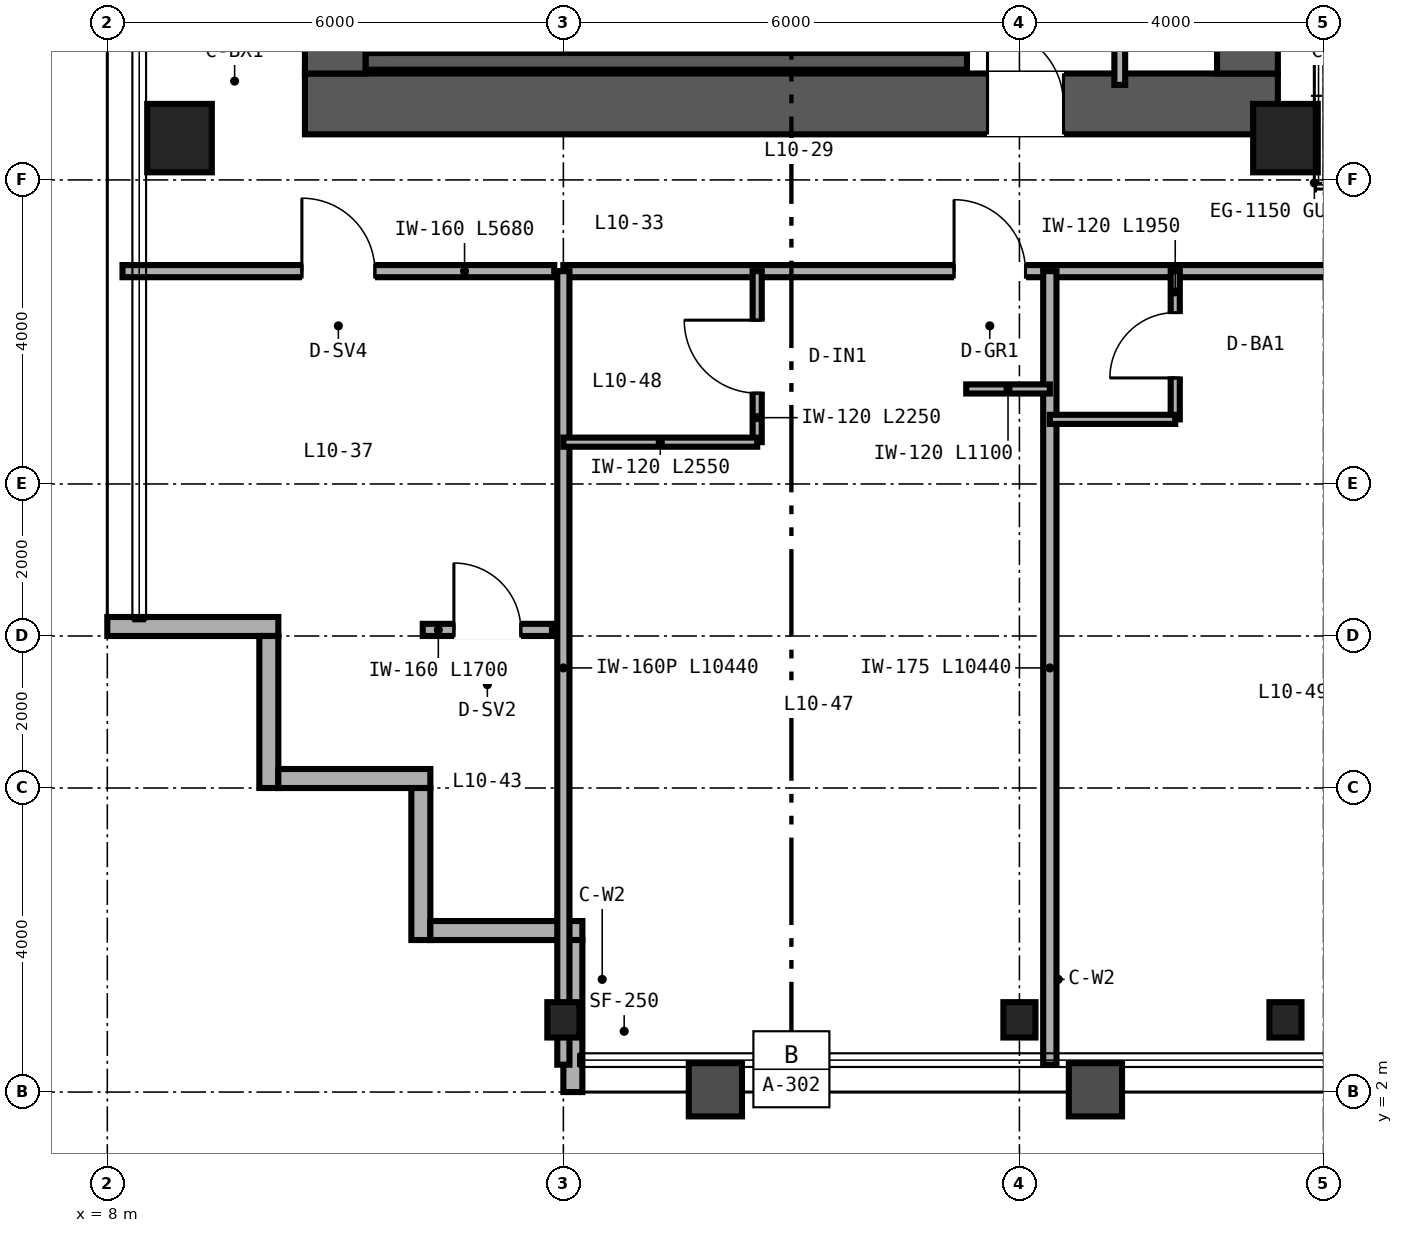
"""IFC4 building model, lengths in metres.
Left out: names, types, materials, properties, quantities, classifications, styles, units other than length and angle.
Written with IfcOpenShell. Run it as: python <this file> out.ifc"""

import sys

from ifc_helpers import new_model, si_unit, direction, frame, frame_2d, origin, origin_2d, place, context, subcontext, project, spatial, rectangle, hollow_rectangle, i_section, extrude, source, transform, mapped, element, fill, save


model = new_model("IFC4")
c1 = context("Model", 3, precision=1e-05, world=origin(), true_north=direction((0.0, 1.0)))
c2 = subcontext(c1, "Body", "Model", "MODEL_VIEW")
j1 = project(units=[si_unit("LENGTHUNIT", "METRE"), si_unit("PLANEANGLEUNIT", "RADIAN")], contexts=[c1])
p1 = place(None, origin())
s1 = spatial("IfcSite", under=j1, at=p1, CompositionType="ELEMENT")
p2 = place(p1, origin())
s2 = spatial("IfcBuilding", under=s1, at=p2, CompositionType="ELEMENT")
p3 = place(p2, frame((0.0, 0.0, 45.6)))
s3 = spatial("IfcBuildingStorey", under=s2, at=p3, CompositionType="ELEMENT", Elevation=45.6)
p4 = place(p3, frame((10.6, 15.0, 0.0), z_axis=(0.0, 0.0, 1.0), x_axis=(1.0, 0.0, 0.0)))
e1 = element("IfcWall", 1, at=p4, inside=s3, PredefinedType="SHEAR", context=c2, shape_type="SweptSolid", body=[
    extrude(rectangle(XDim=12.8, YDim=0.8, at=frame_2d((6.4, 0.0))), origin(), (0.0, 0.0, 1.0), 3.35),
])
p5 = place(p4, frame((8.98, 0.0, 0.0)))
e2 = element("IfcOpeningElement", 2, at=p5, cuts=e1, PredefinedType="OPENING", context=c2, shape_type="SweptSolid", body=[
    extrude(rectangle(XDim=1.0, YDim=2.15, at=frame_2d((0.5, 1.075))), frame((0.0, 0.41, 0.0), z_axis=(0.0, -1.0, 0.0), x_axis=(1.0, 0.0, 0.0)), (0.0, 0.0, 1.0), 0.82),
])
for number, where, z_axis, x_axis in (
    (3, (11.0, 15.4, 0.0), (0.0, 0.0, 1.0), (0.0, 1.0, 0.0)),
    (4, (23.0, 15.4, 0.0), (0.0, 0.0, 1.0), (0.0, 1.0, 0.0)),
):
    element("IfcWall", number, at=place(p3, frame(where, z_axis=z_axis, x_axis=x_axis)), inside=s3, PredefinedType="SHEAR", context=c2, shape_type="SweptSolid", body=[
        extrude(rectangle(XDim=21.2, YDim=0.8, at=frame_2d((10.6, 0.0))), origin(), (0.0, 0.0, 1.0), 3.35),
    ])
p6 = place(p3, frame((11.4, 15.56, 0.0), z_axis=(0.0, 0.0, 1.0), x_axis=(1.0, 0.0, 0.0)))
e5 = element("IfcWall", 5, at=p6, inside=s3, PredefinedType="SHEAR", context=c2, shape_type="SweptSolid", body=[
    extrude(rectangle(XDim=7.91, YDim=0.22, at=frame_2d((3.955, 0.0))), origin(), (0.0, 0.0, 1.0), 3.4),
])
for number, where, z_axis, x_axis in (
    (6, (11.56, 15.67, 0.0), (0.0, 0.0, 1.0), (0.0, 1.0, 0.0)),
    (7, (19.2, 15.67, 0.0), (0.0, 0.0, 1.0), (0.0, 1.0, 0.0)),
):
    element("IfcWall", number, at=place(p3, frame(where, z_axis=z_axis, x_axis=x_axis)), inside=s3, PredefinedType="SHEAR", context=c2, shape_type="SweptSolid", body=[
        extrude(rectangle(XDim=3.28, YDim=0.22, at=frame_2d((1.64, 0.0))), origin(), (0.0, 0.0, 1.0), 3.4),
    ])
m1 = source(origin(), c2, "Body", "SweptSolid", [
    extrude(hollow_rectangle(XDim=0.85, YDim=0.9, WallThickness=0.04, at=origin_2d()), origin(), (0.0, 0.0, 1.0), 3.35),
])
for number, where, z_axis, x_axis in (
    (8, (8.95, 14.55, 0.0), (0.0, 0.0, 1.0), (1.0, 0.0, 0.0)),
    (9, (23.5, 14.55, 0.0), (0.0, 0.0, 1.0), (1.0, 0.0, 0.0)),
):
    element("IfcColumn", number, at=place(p3, frame(where, z_axis=z_axis, x_axis=x_axis)), inside=s3, PredefinedType="COLUMN", context=c2, shape_type="MappedRepresentation", body=[
        mapped(m1, transform((0.0, 0.0, 0.0), scale=1.0)),
    ])
m2 = source(origin(), c2, "Body", "SweptSolid", [
    extrude(i_section(OverallWidth=0.422, OverallDepth=0.465, WebThickness=0.045, FlangeThickness=0.073, FilletRadius=0.025, at=origin_2d()), origin(), (0.0, 0.0, 1.0), 3.35),
])
for number, where, z_axis, x_axis in (
    (10, (14.0, 2.95, 0.0), (0.0, 0.0, 1.0), (1.0, 0.0, 0.0)),
    (11, (20.0, 2.95, 0.0), (0.0, 0.0, 1.0), (1.0, 0.0, 0.0)),
    (12, (23.5, 2.95, 0.0), (0.0, 0.0, 1.0), (1.0, 0.0, 0.0)),
):
    element("IfcColumn", number, at=place(p3, frame(where, z_axis=z_axis, x_axis=x_axis)), inside=s3, PredefinedType="COLUMN", context=c2, shape_type="MappedRepresentation", body=[
        mapped(m2, transform((0.0, 0.0, 0.0), scale=1.0)),
    ])
p7 = place(p3, frame((8.0, 8.125, 0.0), z_axis=(0.0, 0.0, 1.0), x_axis=(1.0, 0.0, 0.0)))
e13 = element("IfcWall", 13, at=p7, inside=s3, PredefinedType="SOLIDWALL", context=c2, shape_type="SweptSolid", body=[
    extrude(rectangle(XDim=2.25, YDim=0.25, at=frame_2d((1.125, 0.0))), origin(), (0.0, 0.0, 1.0), 3.35),
])
for number, where, z_axis, x_axis in (
    (14, (10.125, 8.0, 0.0), (0.0, 0.0, 1.0), (0.0, -1.0, 0.0)),
    (15, (10.25, 6.125, 0.0), (0.0, 0.0, 1.0), (1.0, 0.0, 0.0)),
    (16, (12.125, 6.0, 0.0), (0.0, 0.0, 1.0), (0.0, -1.0, 0.0)),
    (17, (12.25, 4.125, 0.0), (0.0, 0.0, 1.0), (1.0, 0.0, 0.0)),
):
    element("IfcWall", number, at=place(p3, frame(where, z_axis=z_axis, x_axis=x_axis)), inside=s3, PredefinedType="SOLIDWALL", context=c2, shape_type="SweptSolid", body=[
        extrude(rectangle(XDim=2.0, YDim=0.25, at=frame_2d((1.0, 0.0))), origin(), (0.0, 0.0, 1.0), 3.35),
    ])
p8 = place(p3, frame((14.125, 4.0, 0.0), z_axis=(0.0, 0.0, 1.0), x_axis=(0.0, -1.0, 0.0)))
e18 = element("IfcWall", 18, at=p8, inside=s3, PredefinedType="SOLIDWALL", context=c2, shape_type="SweptSolid", body=[
    extrude(rectangle(XDim=2.0, YDim=0.25, at=frame_2d((1.0, 0.0))), origin(), (0.0, 0.0, 1.0), 2.657),
])
p9 = place(p3, frame((21.32, 15.25, 0.0), z_axis=(0.0, 0.0, 1.0), x_axis=(0.0, 1.0, 0.0)))
e19 = element("IfcWall", 19, at=p9, inside=s3, PredefinedType="PARTITIONING", context=c2, shape_type="SweptSolid", body=[
    extrude(rectangle(XDim=3.59, YDim=0.142, at=frame_2d((1.795, 0.0))), origin(), (0.0, 0.0, 1.0), 3.35),
])
p10 = place(p9, frame((1.25, 0.0, 0.0)))
e20 = element("IfcOpeningElement", 20, at=p10, cuts=e19, PredefinedType="OPENING", context=c2, shape_type="SweptSolid", body=[
    extrude(rectangle(XDim=0.84, YDim=2.1, at=frame_2d((0.42, 1.05))), frame((0.0, 0.081, 0.0), z_axis=(0.0, -1.0, 0.0), x_axis=(1.0, 0.0, 0.0)), (0.0, 0.0, 1.0), 0.162),
])
p11 = place(p3, frame((8.2, 12.8, 0.0), z_axis=(0.0, 0.0, 1.0), x_axis=(1.0, 0.0, 0.0)))
e21 = element("IfcWall", 21, at=p11, inside=s3, PredefinedType="PARTITIONING", context=c2, shape_type="SweptSolid", body=[
    extrude(rectangle(XDim=5.68, YDim=0.16, at=frame_2d((2.84, 0.0))), origin(), (0.0, 0.0, 1.0), 3.35),
])
p12 = place(p11, frame((2.36, 0.0, 0.0)))
e22 = element("IfcOpeningElement", 22, at=p12, cuts=e21, PredefinedType="OPENING", context=c2, shape_type="SweptSolid", body=[
    extrude(rectangle(XDim=0.96, YDim=2.15, at=frame_2d((0.48, 1.075))), frame((0.0, 0.09, 0.0), z_axis=(0.0, -1.0, 0.0), x_axis=(1.0, 0.0, 0.0)), (0.0, 0.0, 1.0), 0.18),
])
p13 = place(p3, frame((12.15, 8.08, 0.0), z_axis=(0.0, 0.0, 1.0), x_axis=(1.0, 0.0, 0.0)))
e23 = element("IfcWall", 23, at=p13, inside=s3, PredefinedType="PARTITIONING", context=c2, shape_type="SweptSolid", body=[
    extrude(rectangle(XDim=1.7, YDim=0.16, at=frame_2d((0.85, 0.0))), origin(), (0.0, 0.0, 1.0), 3.35),
])
p14 = place(p13, frame((0.41, 0.0, 0.0)))
e24 = element("IfcOpeningElement", 24, at=p14, cuts=e23, PredefinedType="OPENING", context=c2, shape_type="SweptSolid", body=[
    extrude(rectangle(XDim=0.88, YDim=2.15, at=frame_2d((0.44, 1.075))), frame((0.0, 0.09, 0.0), z_axis=(0.0, -1.0, 0.0), x_axis=(1.0, 0.0, 0.0)), (0.0, 0.0, 1.0), 0.18),
])
p15 = place(p3, frame((14.0, 12.8, 0.0), z_axis=(0.0, 0.0, 1.0), x_axis=(1.0, 0.0, 0.0)))
e25 = element("IfcWall", 25, at=p15, inside=s3, PredefinedType="PARTITIONING", context=c2, shape_type="SweptSolid", body=[
    extrude(rectangle(XDim=36.0, YDim=0.16, at=frame_2d((18.0, 0.0))), origin(), (0.0, 0.0, 1.0), 2.571),
])
p16 = place(p15, frame((5.14, 0.0, 0.0)))
e26 = element("IfcOpeningElement", 26, at=p16, cuts=e25, PredefinedType="OPENING", context=c2, shape_type="SweptSolid", body=[
    extrude(rectangle(XDim=0.94, YDim=2.15, at=frame_2d((0.47, 1.075))), frame((0.0, 0.09, 0.0), z_axis=(0.0, -1.0, 0.0), x_axis=(1.0, 0.0, 0.0)), (0.0, 0.0, 1.0), 0.18),
])
p17 = place(p15, frame((11.34, 0.0, 0.0)))
e27 = element("IfcOpeningElement", 27, at=p17, cuts=e25, PredefinedType="OPENING", context=c2, shape_type="SweptSolid", body=[
    extrude(rectangle(XDim=0.94, YDim=2.15, at=frame_2d((0.47, 1.075))), frame((0.0, 0.09, 0.0), z_axis=(0.0, -1.0, 0.0), x_axis=(1.0, 0.0, 0.0)), (0.0, 0.0, 1.0), 0.18),
])
p18 = place(p15, frame((17.94, 0.0, 0.0)))
e28 = element("IfcOpeningElement", 28, at=p18, cuts=e25, PredefinedType="OPENING", context=c2, shape_type="SweptSolid", body=[
    extrude(rectangle(XDim=0.94, YDim=2.15, at=frame_2d((0.47, 1.075))), frame((0.0, 0.09, 0.0), z_axis=(0.0, -1.0, 0.0), x_axis=(1.0, 0.0, 0.0)), (0.0, 0.0, 1.0), 0.18),
])
p19 = place(p15, frame((21.82, 0.0, 0.0)))
e29 = element("IfcOpeningElement", 29, at=p19, cuts=e25, PredefinedType="OPENING", context=c2, shape_type="SweptSolid", body=[
    extrude(rectangle(XDim=0.96, YDim=2.15, at=frame_2d((0.48, 1.075))), frame((0.0, 0.09, 0.0), z_axis=(0.0, -1.0, 0.0), x_axis=(1.0, 0.0, 0.0)), (0.0, 0.0, 1.0), 0.18),
])
p20 = place(p15, frame((29.54, 0.0, 0.0)))
e30 = element("IfcOpeningElement", 30, at=p20, cuts=e25, PredefinedType="OPENING", context=c2, shape_type="SweptSolid", body=[
    extrude(rectangle(XDim=0.94, YDim=2.15, at=frame_2d((0.47, 1.075))), frame((0.0, 0.09, 0.0), z_axis=(0.0, -1.0, 0.0), x_axis=(1.0, 0.0, 0.0)), (0.0, 0.0, 1.0), 0.18),
])
p21 = place(p15, frame((32.92, 0.0, 0.0)))
e31 = element("IfcOpeningElement", 31, at=p21, cuts=e25, PredefinedType="OPENING", context=c2, shape_type="SweptSolid", body=[
    extrude(rectangle(XDim=0.96, YDim=2.15, at=frame_2d((0.48, 1.075))), frame((0.0, 0.09, 0.0), z_axis=(0.0, -1.0, 0.0), x_axis=(1.0, 0.0, 0.0)), (0.0, 0.0, 1.0), 0.18),
])
p22 = place(p3, frame((14.0, 2.36, 0.0), z_axis=(0.0, 0.0, 1.0), x_axis=(0.0, 1.0, 0.0)))
e32 = element("IfcWall", 32, at=p22, inside=s3, PredefinedType="PARTITIONING", context=c2, shape_type="SweptSolid", body=[
    extrude(rectangle(XDim=10.44, YDim=0.16, at=frame_2d((5.22, 0.0))), origin(), (0.0, 0.0, 1.0), 2.657),
])
p23 = place(p3, frame((20.4, 2.36, 0.0), z_axis=(0.0, 0.0, 1.0), x_axis=(0.0, 1.0, 0.0)))
e33 = element("IfcWall", 33, at=p23, inside=s3, PredefinedType="PARTITIONING", context=c2, shape_type="SweptSolid", body=[
    extrude(rectangle(XDim=10.44, YDim=0.175, at=frame_2d((5.22, 0.0))), origin(), (0.0, 0.0, 1.0), 2.813),
])
p24 = place(p3, frame((16.55, 10.55, 0.0), z_axis=(0.0, 0.0, 1.0), x_axis=(0.0, 1.0, 0.0)))
e34 = element("IfcWall", 34, at=p24, inside=s3, PredefinedType="PARTITIONING", context=c2, shape_type="SweptSolid", body=[
    extrude(rectangle(XDim=2.25, YDim=0.12, at=frame_2d((1.125, 0.0))), origin(), (0.0, 0.0, 1.0), 3.35),
])
p25 = place(p24, frame((0.645, 0.0, 0.0)))
e35 = element("IfcOpeningElement", 35, at=p25, cuts=e34, PredefinedType="OPENING", context=c2, shape_type="SweptSolid", body=[
    extrude(rectangle(XDim=0.96, YDim=2.15, at=frame_2d((0.48, 1.075))), frame((0.0, 0.07, 0.0), z_axis=(0.0, -1.0, 0.0), x_axis=(1.0, 0.0, 0.0)), (0.0, 0.0, 1.0), 0.14),
])
p26 = place(p3, frame((14.0, 10.55, 0.0), z_axis=(0.0, 0.0, 1.0), x_axis=(1.0, 0.0, 0.0)))
e36 = element("IfcWall", 36, at=p26, inside=s3, PredefinedType="PARTITIONING", context=c2, shape_type="SweptSolid", body=[
    extrude(rectangle(XDim=2.55, YDim=0.12, at=frame_2d((1.275, 0.0))), origin(), (0.0, 0.0, 1.0), 3.35),
])
p27 = place(p3, frame((19.3, 11.25, 0.0), z_axis=(0.0, 0.0, 1.0), x_axis=(1.0, 0.0, 0.0)))
e37 = element("IfcWall", 37, at=p27, inside=s3, PredefinedType="PARTITIONING", context=c2, shape_type="SweptSolid", body=[
    extrude(rectangle(XDim=1.1, YDim=0.12, at=frame_2d((0.55, 0.0))), origin(), (0.0, 0.0, 1.0), 3.35),
])
p28 = place(p3, frame((22.05, 10.85, 0.0), z_axis=(0.0, 0.0, 1.0), x_axis=(0.0, 1.0, 0.0)))
e38 = element("IfcWall", 38, at=p28, inside=s3, PredefinedType="PARTITIONING", context=c2, shape_type="SweptSolid", body=[
    extrude(rectangle(XDim=1.95, YDim=0.12, at=frame_2d((0.975, 0.0))), origin(), (0.0, 0.0, 1.0), 3.35),
])
p29 = place(p28, frame((0.545, 0.0, 0.0)))
e39 = element("IfcOpeningElement", 39, at=p29, cuts=e38, PredefinedType="OPENING", context=c2, shape_type="SweptSolid", body=[
    extrude(rectangle(XDim=0.86, YDim=2.1, at=frame_2d((0.43, 1.05))), frame((0.0, 0.07, 0.0), z_axis=(0.0, -1.0, 0.0), x_axis=(1.0, 0.0, 0.0)), (0.0, 0.0, 1.0), 0.14),
])
p30 = place(p3, frame((20.4, 10.85, 0.0), z_axis=(0.0, 0.0, 1.0), x_axis=(1.0, 0.0, 0.0)))
e40 = element("IfcWall", 40, at=p30, inside=s3, PredefinedType="PARTITIONING", context=c2, shape_type="SweptSolid", body=[
    extrude(rectangle(XDim=1.65, YDim=0.12, at=frame_2d((0.825, 0.0))), origin(), (0.0, 0.0, 1.0), 3.35),
])
m3 = source(origin(), c2, "Body", "SweptSolid", [
    extrude(rectangle(XDim=1.0, YDim=2.15, at=frame_2d((0.5, 1.075))), frame((0.0, 0.025, 0.0), z_axis=(0.0, -1.0, 0.0), x_axis=(1.0, 0.0, 0.0)), (0.0, 0.0, 1.0), 0.05),
])
p31 = place(p5, origin())
e41 = element("IfcDoor", 41, at=p31, inside=s3, OperationType="SINGLE_SWING_LEFT", PredefinedType="DOOR", context=c2, shape_type="MappedRepresentation", body=[
    mapped(m3, transform((0.0, 0.0, 0.0), scale=1.0)),
])
fill(e2, e41)
m4 = source(origin(), c2, "Body", "SweptSolid", [
    extrude(rectangle(XDim=0.96, YDim=2.15, at=frame_2d((0.48, 1.075))), frame((0.0, 0.025, 0.0), z_axis=(0.0, -1.0, 0.0), x_axis=(1.0, 0.0, 0.0)), (0.0, 0.0, 1.0), 0.05),
])
p32 = place(p12, origin())
e42 = element("IfcDoor", 42, at=p32, inside=s3, OperationType="SINGLE_SWING_LEFT", PredefinedType="DOOR", context=c2, shape_type="MappedRepresentation", body=[
    mapped(m4, transform((0.0, 0.0, 0.0), scale=1.0)),
])
fill(e22, e42)
m5 = source(origin(), c2, "Body", "SweptSolid", [
    extrude(rectangle(XDim=0.88, YDim=2.15, at=frame_2d((0.44, 1.075))), frame((0.0, 0.025, 0.0), z_axis=(0.0, -1.0, 0.0), x_axis=(1.0, 0.0, 0.0)), (0.0, 0.0, 1.0), 0.05),
])
p33 = place(p14, origin())
e43 = element("IfcDoor", 43, at=p33, inside=s3, OperationType="SINGLE_SWING_LEFT", PredefinedType="DOOR", context=c2, shape_type="MappedRepresentation", body=[
    mapped(m5, transform((0.0, 0.0, 0.0), scale=1.0)),
])
fill(e24, e43)
p34 = place(p25, origin())
e44 = element("IfcDoor", 44, at=p34, inside=s3, OperationType="SINGLE_SWING_RIGHT", PredefinedType="DOOR", context=c2, shape_type="MappedRepresentation", body=[
    mapped(m4, transform((0.0, 0.0, 0.0), scale=1.0)),
])
fill(e35, e44)
m6 = source(origin(), c2, "Body", "SweptSolid", [
    extrude(rectangle(XDim=0.86, YDim=2.1, at=frame_2d((0.43, 1.05))), frame((0.0, 0.025, 0.0), z_axis=(0.0, -1.0, 0.0), x_axis=(1.0, 0.0, 0.0)), (0.0, 0.0, 1.0), 0.05),
])
p35 = place(p29, origin())
e45 = element("IfcDoor", 45, at=p35, inside=s3, OperationType="SINGLE_SWING_LEFT", PredefinedType="DOOR", context=c2, shape_type="MappedRepresentation", body=[
    mapped(m6, transform((0.0, 0.0, 0.0), scale=1.0)),
])
fill(e39, e45)
m7 = source(origin(), c2, "Body", "SweptSolid", [
    extrude(rectangle(XDim=0.94, YDim=2.15, at=frame_2d((0.47, 1.075))), frame((0.0, 0.025, 0.0), z_axis=(0.0, -1.0, 0.0), x_axis=(1.0, 0.0, 0.0)), (0.0, 0.0, 1.0), 0.05),
])
p36 = place(p16, origin())
e46 = element("IfcDoor", 46, at=p36, inside=s3, OperationType="SINGLE_SWING_LEFT", PredefinedType="DOOR", context=c2, shape_type="MappedRepresentation", body=[
    mapped(m7, transform((0.0, 0.0, 0.0), scale=1.0)),
])
fill(e26, e46)
save(model, sys.argv[1])
